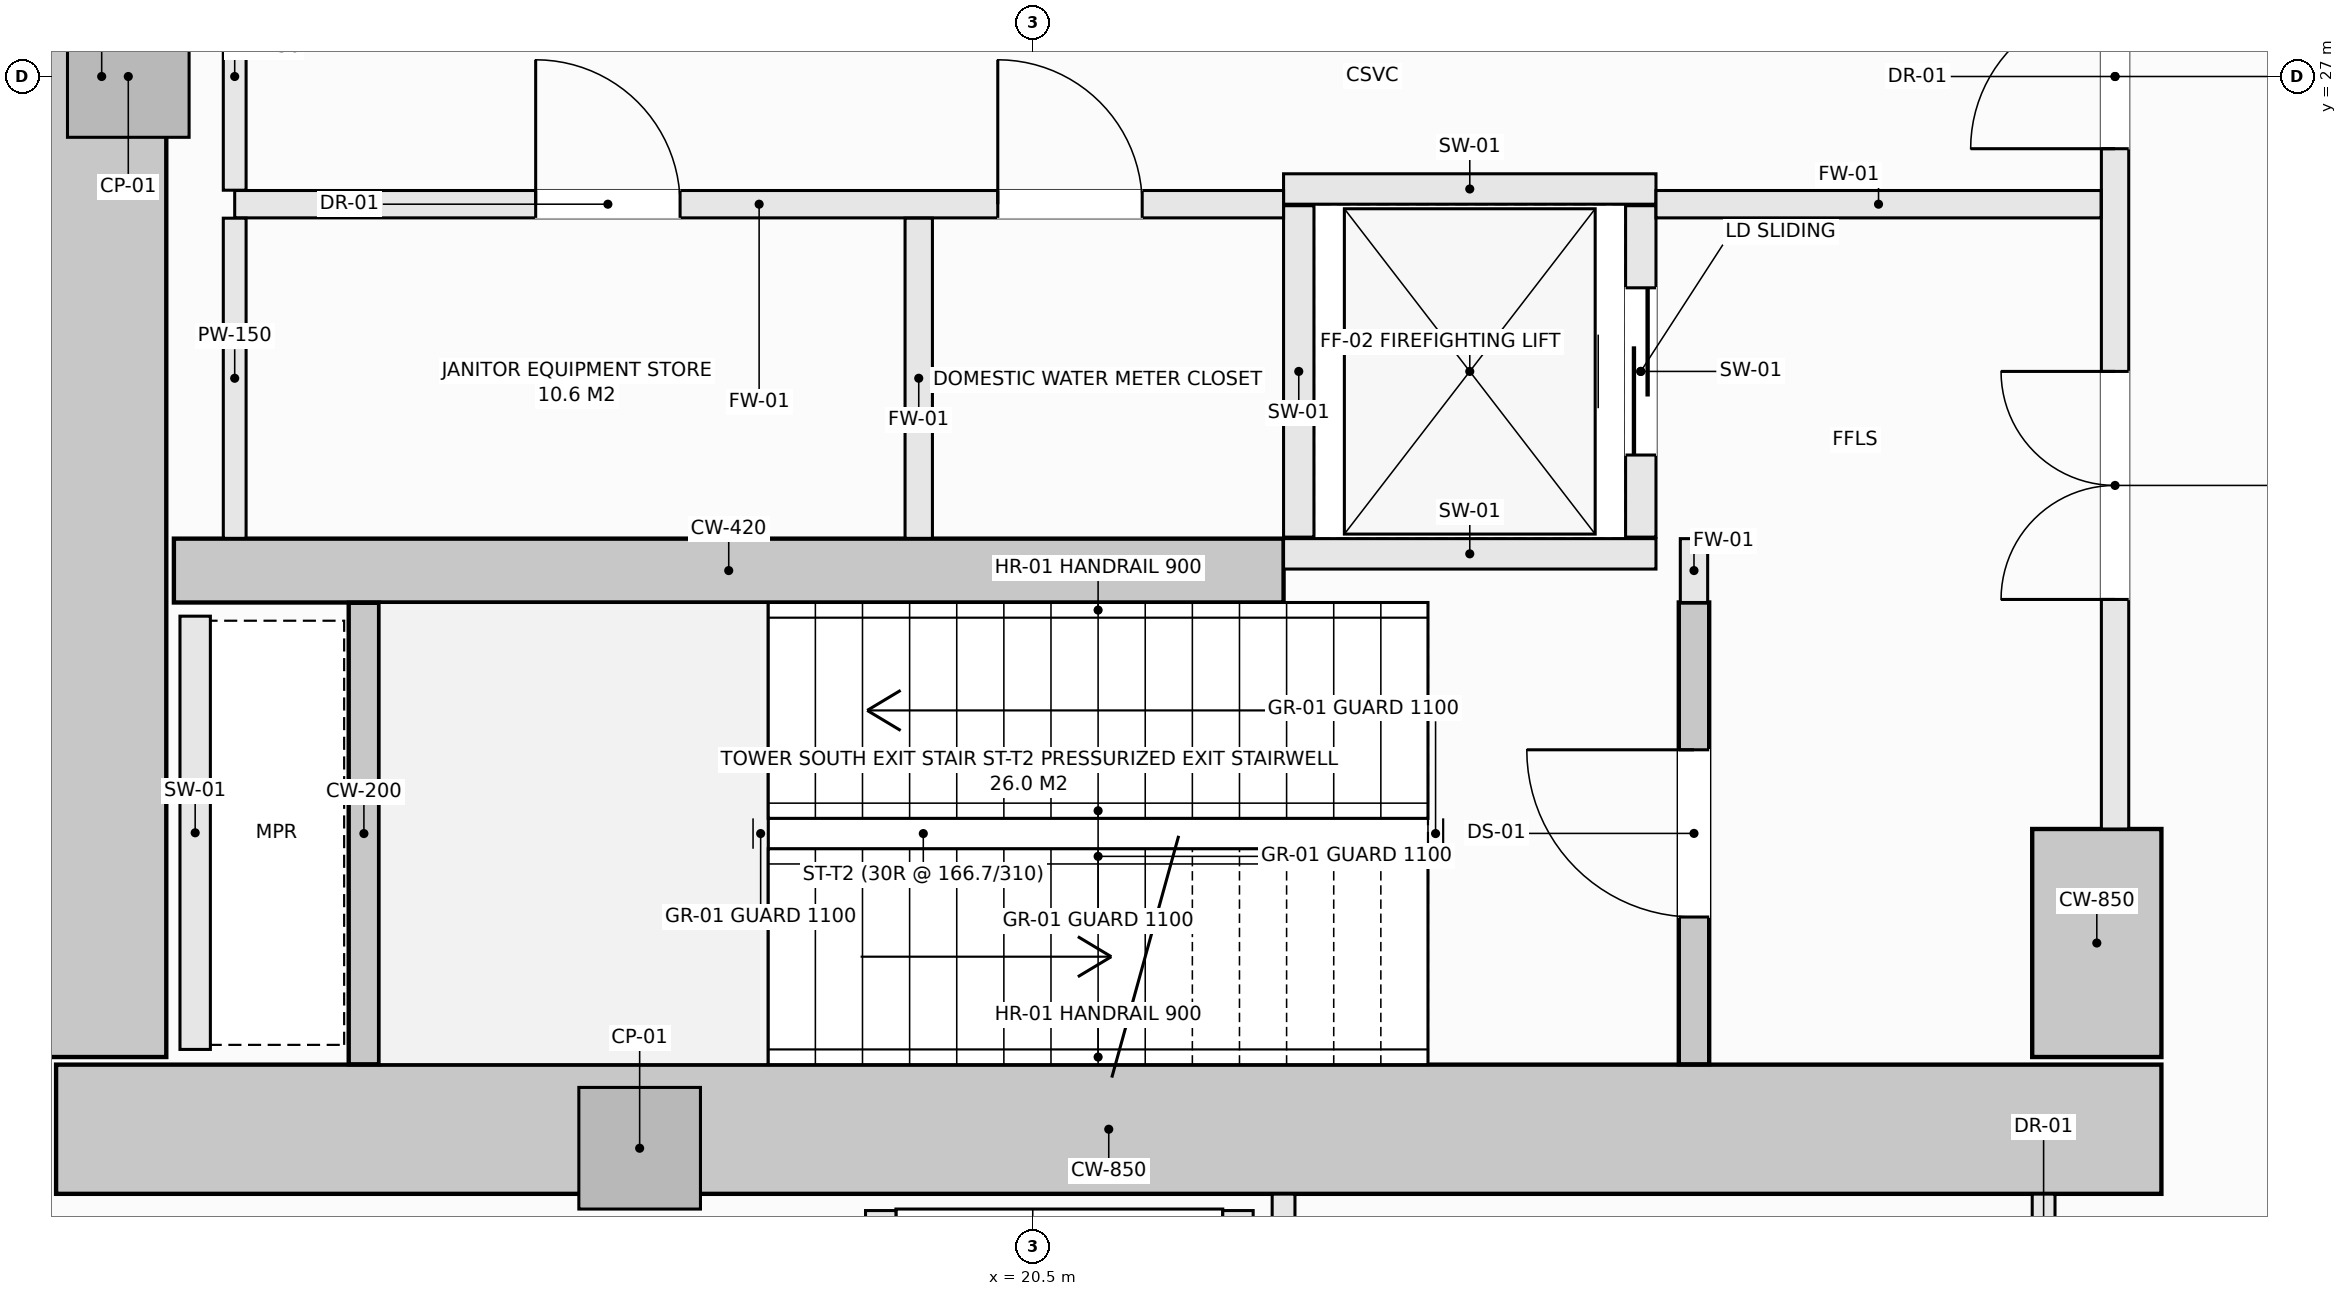
"""IFC4 building model, lengths in metres.
Left out: names, types, materials, properties, quantities, classifications, styles, units other than length and angle.
Written with IfcOpenShell. Run it as: python <this file> out.ifc"""

import sys

from ifc_helpers import new_model, si_unit, direction, frame, frame_2d, origin, origin_2d, place, context, subcontext, project, spatial, rectangle, extrude, element, fill, save


model = new_model("IFC4")
c1 = context("Model", 3, precision=1e-05, world=origin(), true_north=direction((0.0, 1.0)))
c2 = subcontext(c1, "Body", "Model", "MODEL_VIEW")
j1 = project(units=[si_unit("LENGTHUNIT", "METRE"), si_unit("PLANEANGLEUNIT", "RADIAN")], contexts=[c1])
p1 = place(None, origin())
s1 = spatial("IfcSite", under=j1, at=p1, CompositionType="ELEMENT")
p2 = place(p1, origin())
s2 = spatial("IfcBuilding", under=s1, at=p2, CompositionType="ELEMENT")
p3 = place(p2, origin())
s3 = spatial("IfcBuildingStorey", under=s2, at=p3, CompositionType="ELEMENT", Elevation=0.0)
p4 = place(p3, frame((14.075, 20.075, -0.36), z_axis=(0.0, 0.0, 1.0), x_axis=(1.0, 0.0, 0.0)))
e1 = element("IfcWall", 1, at=p4, inside=s3, PredefinedType="SHEAR", context=c2, shape_type="SweptSolid", body=[
    extrude(rectangle(XDim=13.85, YDim=0.85, at=frame_2d((6.925, 0.0))), origin(), (0.0, 0.0, 1.0), 5.1),
])
p5 = place(p3, frame((14.375, 20.55, -0.36), z_axis=(0.0, 0.0, 1.0), x_axis=(0.0, 1.0, 0.0)))
e2 = element("IfcWall", 2, at=p5, inside=s3, PredefinedType="SHEAR", context=c2, shape_type="SweptSolid", body=[
    extrude(rectangle(XDim=12.9, YDim=0.85, at=frame_2d((6.45, 0.0))), origin(), (0.0, 0.0, 1.0), 5.1),
])
p6 = place(p3, frame((27.5, 20.55, -0.36), z_axis=(0.0, 0.0, 1.0), x_axis=(0.0, 1.0, 0.0)))
e3 = element("IfcWall", 3, at=p6, inside=s3, PredefinedType="SHEAR", context=c2, shape_type="SweptSolid", body=[
    extrude(rectangle(XDim=1.5, YDim=0.85, at=frame_2d((0.75, 0.0))), origin(), (0.0, 0.0, 1.0), 5.1),
])
p7 = place(p3, frame((14.85, 23.75, -0.36), z_axis=(0.0, 0.0, 1.0), x_axis=(1.0, 0.0, 0.0)))
e4 = element("IfcWall", 4, at=p7, inside=s3, PredefinedType="SHEAR", context=c2, shape_type="SweptSolid", body=[
    extrude(rectangle(XDim=7.3, YDim=0.42, at=frame_2d((3.65, 0.0))), origin(), (0.0, 0.0, 1.0), 5.1),
])
for number, where, z_axis, x_axis in (
    (5, (14.55, 27.0, -0.36), (0.0, 0.0, 1.0), (1.0, 0.0, 0.0)),
    (6, (17.914, 19.95, -0.36), (0.0, 0.0, 1.0), (1.0, 0.0, 0.0)),
):
    element("IfcColumn", number, at=place(p3, frame(where, z_axis=z_axis, x_axis=x_axis)), inside=s3, PredefinedType="PILASTER", context=c2, shape_type="SweptSolid", body=[
        extrude(rectangle(XDim=0.8, YDim=0.8, at=origin_2d()), origin(), (0.0, 0.0, 1.0), 5.1),
    ])
p8 = place(p3, frame((24.85, 20.502, -0.36), z_axis=(0.0, 0.0, 1.0), x_axis=(0.0, 1.0, 0.0)))
e7 = element("IfcWall", 7, at=p8, inside=s3, PredefinedType="SHEAR", context=c2, shape_type="SweptSolid", body=[
    extrude(rectangle(XDim=3.038, YDim=0.2, at=frame_2d((1.519, 0.0))), origin(), (0.0, 0.0, 1.0), 5.1),
])
p9 = place(p8, frame((0.969, 0.0, 0.36)))
e8 = element("IfcOpeningElement", 8, at=p9, cuts=e7, PredefinedType="OPENING", context=c2, shape_type="SweptSolid", body=[
    extrude(rectangle(XDim=1.1, YDim=2.15, at=frame_2d((0.55, 1.075))), frame((0.0, 0.11, 0.0), z_axis=(0.0, -1.0, 0.0), x_axis=(1.0, 0.0, 0.0)), (0.0, 0.0, 1.0), 0.22),
])
p10 = place(p3, frame((16.1, 20.502, -0.36), z_axis=(0.0, 0.0, 1.0), x_axis=(0.0, 1.0, 0.0)))
e9 = element("IfcWall", 9, at=p10, inside=s3, PredefinedType="SHEAR", context=c2, shape_type="SweptSolid", body=[
    extrude(rectangle(XDim=3.036, YDim=0.2, at=frame_2d((1.518, 0.0))), origin(), (0.0, 0.0, 1.0), 5.1),
])
for number, where, z_axis, x_axis in (
    (10, (22.15, 26.26, 0.0), (0.0, 0.0, 1.0), (1.0, 0.0, 0.0)),
    (11, (22.15, 23.86, 0.0), (0.0, 0.0, 1.0), (1.0, 0.0, 0.0)),
):
    element("IfcWall", number, at=place(p3, frame(where, z_axis=z_axis, x_axis=x_axis)), inside=s3, PredefinedType="SOLIDWALL", context=c2, shape_type="SweptSolid", body=[
        extrude(rectangle(XDim=2.45, YDim=0.2, at=frame_2d((1.225, 0.0))), origin(), (0.0, 0.0, 1.0), 4.74),
    ])
p11 = place(p3, frame((22.25, 23.97, 0.0), z_axis=(0.0, 0.0, 1.0), x_axis=(0.0, 1.0, 0.0)))
e12 = element("IfcWall", 12, at=p11, inside=s3, PredefinedType="SOLIDWALL", context=c2, shape_type="SweptSolid", body=[
    extrude(rectangle(XDim=2.18, YDim=0.2, at=frame_2d((1.09, 0.0))), origin(), (0.0, 0.0, 1.0), 4.74),
])
p12 = place(p3, frame((24.5, 23.97, 0.0), z_axis=(0.0, 0.0, 1.0), x_axis=(0.0, 1.0, 0.0)))
e13 = element("IfcWall", 13, at=p12, inside=s3, PredefinedType="SOLIDWALL", context=c2, shape_type="SweptSolid", body=[
    extrude(rectangle(XDim=2.18, YDim=0.2, at=frame_2d((1.09, 0.0))), origin(), (0.0, 0.0, 1.0), 4.74),
])
p13 = place(p12, frame((0.54, 0.0, 0.0)))
e14 = element("IfcOpeningElement", 14, at=p13, cuts=e13, PredefinedType="OPENING", context=c2, shape_type="SweptSolid", body=[
    extrude(rectangle(XDim=1.1, YDim=2.2, at=frame_2d((0.55, 1.1))), frame((0.0, 0.11, 0.0), z_axis=(0.0, -1.0, 0.0), x_axis=(1.0, 0.0, 0.0)), (0.0, 0.0, 1.0), 0.22),
])
for number, where, z_axis, x_axis in (
    (15, (19.5, 17.01, 0.0), (0.0, 0.0, 1.0), (0.0, 1.0, 0.0)),
    (16, (21.85, 17.01, 0.0), (0.0, 0.0, 1.0), (0.0, 1.0, 0.0)),
):
    element("IfcWall", number, at=place(p3, frame(where, z_axis=z_axis, x_axis=x_axis)), inside=s3, PredefinedType="SOLIDWALL", context=c2, shape_type="SweptSolid", body=[
        extrude(rectangle(XDim=2.53, YDim=0.2, at=frame_2d((1.265, 0.0))), origin(), (0.0, 0.0, 1.0), 4.74),
    ])
p14 = place(p3, frame((14.99, 20.6, 0.0), z_axis=(0.0, 0.0, 1.0), x_axis=(0.0, 1.0, 0.0)))
e17 = element("IfcWall", 17, at=p14, inside=s3, PredefinedType="SOLIDWALL", context=c2, shape_type="SweptSolid", body=[
    extrude(rectangle(XDim=2.85, YDim=0.2, at=frame_2d((1.425, 0.0))), origin(), (0.0, 0.0, 1.0), 4.74),
])
p15 = place(p3, frame((24.85, 23.54, 0.0), z_axis=(0.0, 0.0, 1.0), x_axis=(0.0, 1.0, 0.0)))
e18 = element("IfcWall", 18, at=p15, inside=s3, PredefinedType="SOLIDWALL", context=c2, shape_type="SweptSolid", body=[
    extrude(rectangle(XDim=0.42, YDim=0.18, at=frame_2d((0.21, 0.0))), origin(), (0.0, 0.0, 1.0), 4.74),
])
p16 = place(p3, frame((27.62, 22.05, 0.0), z_axis=(0.0, 0.0, 1.0), x_axis=(0.0, 1.0, 0.0)))
e19 = element("IfcWall", 19, at=p16, inside=s3, PredefinedType="SOLIDWALL", context=c2, shape_type="SweptSolid", body=[
    extrude(rectangle(XDim=9.9, YDim=0.18, at=frame_2d((4.95, 0.0))), origin(), (0.0, 0.0, 1.0), 3.832),
])
p17 = place(p16, frame((4.475, 0.0, 0.0)))
e20 = element("IfcOpeningElement", 20, at=p17, cuts=e19, PredefinedType="OPENING", context=c2, shape_type="SweptSolid", body=[
    extrude(rectangle(XDim=0.95, YDim=2.1, at=frame_2d((0.475, 1.05))), frame((0.0, 0.1, 0.0), z_axis=(0.0, -1.0, 0.0), x_axis=(1.0, 0.0, 0.0)), (0.0, 0.0, 1.0), 0.2),
])
p18 = place(p16, frame((6.89, 0.0, 0.0)))
e21 = element("IfcOpeningElement", 21, at=p18, cuts=e19, PredefinedType="OPENING", context=c2, shape_type="SweptSolid", body=[
    extrude(rectangle(XDim=1.5, YDim=2.2, at=frame_2d((0.75, 1.1))), frame((0.0, 0.1, 0.0), z_axis=(0.0, -1.0, 0.0), x_axis=(1.0, 0.0, 0.0)), (0.0, 0.0, 1.0), 0.2),
])
p19 = place(p16, frame((1.51, 0.0, 0.0)))
e22 = element("IfcOpeningElement", 22, at=p19, cuts=e19, PredefinedType="OPENING", context=c2, shape_type="SweptSolid", body=[
    extrude(rectangle(XDim=1.5, YDim=2.2, at=frame_2d((0.75, 1.1))), frame((0.0, 0.1, 0.0), z_axis=(0.0, -1.0, 0.0), x_axis=(1.0, 0.0, 0.0)), (0.0, 0.0, 1.0), 0.2),
])
p20 = place(p3, frame((15.25, 26.16, 0.0), z_axis=(0.0, 0.0, 1.0), x_axis=(1.0, 0.0, 0.0)))
e23 = element("IfcWall", 23, at=p20, inside=s3, PredefinedType="SOLIDWALL", context=c2, shape_type="SweptSolid", body=[
    extrude(rectangle(XDim=6.9, YDim=0.18, at=frame_2d((3.45, 0.0))), origin(), (0.0, 0.0, 1.0), 4.74),
])
p21 = place(p20, frame((5.02, 0.0, 0.0)))
e24 = element("IfcOpeningElement", 24, at=p21, cuts=e23, PredefinedType="OPENING", context=c2, shape_type="SweptSolid", body=[
    extrude(rectangle(XDim=0.95, YDim=2.1, at=frame_2d((0.475, 1.05))), frame((0.0, 0.1, 0.0), z_axis=(0.0, -1.0, 0.0), x_axis=(1.0, 0.0, 0.0)), (0.0, 0.0, 1.0), 0.2),
])
p22 = place(p20, frame((1.98, 0.0, 0.0)))
e25 = element("IfcOpeningElement", 25, at=p22, cuts=e23, PredefinedType="OPENING", context=c2, shape_type="SweptSolid", body=[
    extrude(rectangle(XDim=0.95, YDim=2.1, at=frame_2d((0.475, 1.05))), frame((0.0, 0.1, 0.0), z_axis=(0.0, -1.0, 0.0), x_axis=(1.0, 0.0, 0.0)), (0.0, 0.0, 1.0), 0.2),
])
p23 = place(p3, frame((24.6, 26.16, 0.0), z_axis=(0.0, 0.0, 1.0), x_axis=(1.0, 0.0, 0.0)))
e26 = element("IfcWall", 26, at=p23, inside=s3, PredefinedType="SOLIDWALL", context=c2, shape_type="SweptSolid", body=[
    extrude(rectangle(XDim=2.928, YDim=0.18, at=frame_2d((1.464, 0.0))), origin(), (0.0, 0.0, 1.0), 4.74),
])
p24 = place(p3, frame((15.25, 23.962, 0.0), z_axis=(0.0, 0.0, 1.0), x_axis=(0.0, 1.0, 0.0)))
e27 = element("IfcWall", 27, at=p24, inside=s3, PredefinedType="PARTITIONING", context=c2, shape_type="SweptSolid", body=[
    extrude(rectangle(XDim=2.106, YDim=0.15, at=frame_2d((1.053, 0.0))), origin(), (0.0, 0.0, 1.0), 4.74),
])
p25 = place(p3, frame((15.25, 26.252, 0.0), z_axis=(0.0, 0.0, 1.0), x_axis=(0.0, 1.0, 0.0)))
e28 = element("IfcWall", 28, at=p25, inside=s3, PredefinedType="PARTITIONING", context=c2, shape_type="SweptSolid", body=[
    extrude(rectangle(XDim=1.496, YDim=0.15, at=frame_2d((0.748, 0.0))), origin(), (0.0, 0.0, 1.0), 4.74),
])
p26 = place(p3, frame((19.75, 23.962, 0.0), z_axis=(0.0, 0.0, 1.0), x_axis=(0.0, 1.0, 0.0)))
e29 = element("IfcWall", 29, at=p26, inside=s3, PredefinedType="SOLIDWALL", context=c2, shape_type="SweptSolid", body=[
    extrude(rectangle(XDim=2.106, YDim=0.18, at=frame_2d((1.053, 0.0))), origin(), (0.0, 0.0, 1.0), 4.74),
])
p27 = place(p3, frame((22.15, 17.127, 0.0), z_axis=(0.0, 0.0, 1.0), x_axis=(0.0, 1.0, 0.0)))
e30 = element("IfcWall", 30, at=p27, inside=s3, PredefinedType="PARTITIONING", context=c2, shape_type="SweptSolid", body=[
    extrude(rectangle(XDim=2.521, YDim=0.15, at=frame_2d((1.26, 0.0))), origin(), (0.0, 0.0, 1.0), 4.74),
])
p28 = place(p3, frame((27.15, 17.127, 0.0), z_axis=(0.0, 0.0, 1.0), x_axis=(0.0, 1.0, 0.0)))
e31 = element("IfcWall", 31, at=p28, inside=s3, PredefinedType="PARTITIONING", context=c2, shape_type="SweptSolid", body=[
    extrude(rectangle(XDim=2.521, YDim=0.15, at=frame_2d((1.26, 0.0))), origin(), (0.0, 0.0, 1.0), 4.74),
])
p29 = place(p28, frame((0.785, 0.0, 0.0)))
e32 = element("IfcOpeningElement", 32, at=p29, cuts=e31, PredefinedType="OPENING", context=c2, shape_type="SweptSolid", body=[
    extrude(rectangle(XDim=0.95, YDim=2.1, at=frame_2d((0.475, 1.05))), frame((0.0, 0.085, 0.0), z_axis=(0.0, -1.0, 0.0), x_axis=(1.0, 0.0, 0.0)), (0.0, 0.0, 1.0), 0.17),
])
p30 = place(p9, origin())
e33 = element("IfcDoor", 33, at=p30, inside=s3, OperationType="SINGLE_SWING_RIGHT", PredefinedType="DOOR", context=c2, shape_type="SweptSolid", body=[
    extrude(rectangle(XDim=1.1, YDim=2.15, at=frame_2d((0.55, 1.075))), frame((0.0, 0.025, 0.0), z_axis=(0.0, -1.0, 0.0), x_axis=(1.0, 0.0, 0.0)), (0.0, 0.0, 1.0), 0.05),
])
fill(e8, e33)
p31 = place(p13, origin())
e34 = element("IfcDoor", 34, at=p31, inside=s3, OperationType="SLIDING_TO_LEFT", PredefinedType="DOOR", context=c2, shape_type="SweptSolid", body=[
    extrude(rectangle(XDim=1.1, YDim=2.2, at=frame_2d((0.55, 1.1))), frame((0.0, 0.025, 0.0), z_axis=(0.0, -1.0, 0.0), x_axis=(1.0, 0.0, 0.0)), (0.0, 0.0, 1.0), 0.05),
])
fill(e14, e34)
p32 = place(p17, origin())
e35 = element("IfcDoor", 35, at=p32, inside=s3, OperationType="SINGLE_SWING_LEFT", PredefinedType="DOOR", context=c2, shape_type="SweptSolid", body=[
    extrude(rectangle(XDim=0.95, YDim=2.1, at=frame_2d((0.475, 1.05))), frame((0.0, 0.025, 0.0), z_axis=(0.0, -1.0, 0.0), x_axis=(1.0, 0.0, 0.0)), (0.0, 0.0, 1.0), 0.05),
])
fill(e20, e35)
p33 = place(p19, origin())
e36 = element("IfcDoor", 36, at=p33, inside=s3, OperationType="DOUBLE_DOOR_SINGLE_SWING", PredefinedType="DOOR", context=c2, shape_type="SweptSolid", body=[
    extrude(rectangle(XDim=1.5, YDim=2.2, at=frame_2d((0.75, 1.1))), frame((0.0, 0.025, 0.0), z_axis=(0.0, -1.0, 0.0), x_axis=(1.0, 0.0, 0.0)), (0.0, 0.0, 1.0), 0.05),
])
fill(e22, e36)
p34 = place(p21, origin())
e37 = element("IfcDoor", 37, at=p34, inside=s3, OperationType="SINGLE_SWING_LEFT", PredefinedType="DOOR", context=c2, shape_type="SweptSolid", body=[
    extrude(rectangle(XDim=0.95, YDim=2.1, at=frame_2d((0.475, 1.05))), frame((0.0, 0.025, 0.0), z_axis=(0.0, -1.0, 0.0), x_axis=(1.0, 0.0, 0.0)), (0.0, 0.0, 1.0), 0.05),
])
fill(e24, e37)
p35 = place(p22, origin())
e38 = element("IfcDoor", 38, at=p35, inside=s3, OperationType="SINGLE_SWING_LEFT", PredefinedType="DOOR", context=c2, shape_type="SweptSolid", body=[
    extrude(rectangle(XDim=0.95, YDim=2.1, at=frame_2d((0.475, 1.05))), frame((0.0, 0.025, 0.0), z_axis=(0.0, -1.0, 0.0), x_axis=(1.0, 0.0, 0.0)), (0.0, 0.0, 1.0), 0.05),
])
fill(e25, e38)
save(model, sys.argv[1])
